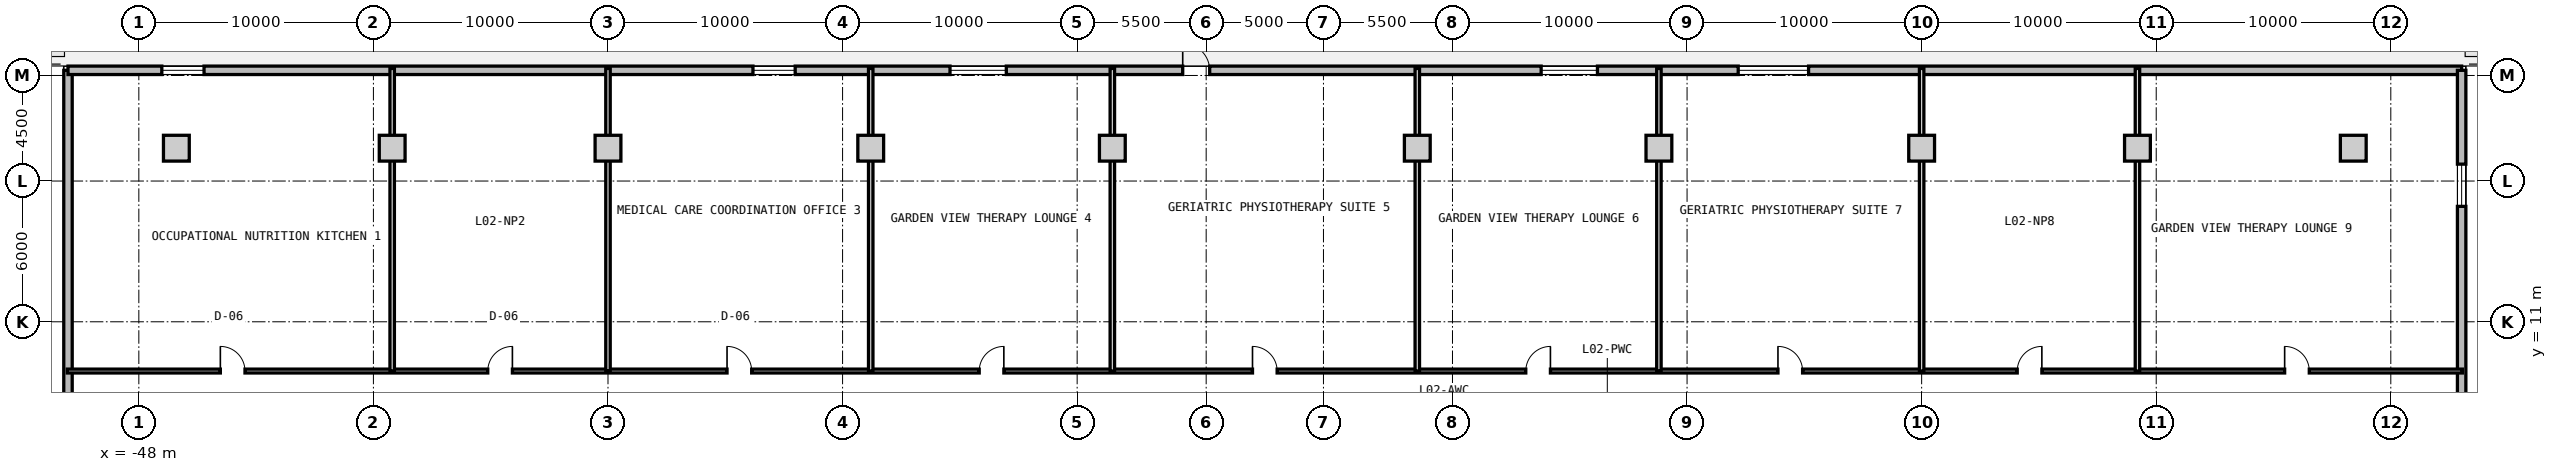
"""IFC4 building model, lengths in metres.
Left out: names, types, materials, properties, quantities, classifications, styles, units other than length and angle.
Written with IfcOpenShell. Run it as: python <this file> out.ifc"""

import sys

from ifc_helpers import new_model, si_unit, direction, frame, frame_2d, origin, origin_2d, place, context, subcontext, project, spatial, rectangle, extrude, source, transform, mapped, element, fill, save


model = new_model("IFC4")
c1 = context("Model", 3, precision=1e-05, world=origin(), true_north=direction((0.0, 1.0)))
c2 = subcontext(c1, "Body", "Model", "MODEL_VIEW")
j1 = project(units=[si_unit("LENGTHUNIT", "METRE"), si_unit("PLANEANGLEUNIT", "RADIAN")], contexts=[c1])
p1 = place(None, origin())
s1 = spatial("IfcSite", under=j1, at=p1, CompositionType="ELEMENT")
p2 = place(p1, origin())
s2 = spatial("IfcBuilding", under=s1, at=p2, CompositionType="ELEMENT")
p3 = place(p2, frame((0.0, 0.0, 8.4)))
s3 = spatial("IfcBuildingStorey", under=s2, at=p3, CompositionType="ELEMENT", Elevation=8.4)
m1 = source(origin(), c2, "Body", "SweptSolid", [
    extrude(rectangle(XDim=1.1, YDim=1.1, at=origin_2d()), origin(), (0.0, 0.0, 1.0), 4.2),
])
for number, where, z_axis, x_axis in (
    (1, (-46.4, 18.4, 0.0), (0.0, 0.0, 1.0), (1.0, 0.0, 0.0)),
    (2, (-37.2, 18.4, 0.0), (0.0, 0.0, 1.0), (1.0, 0.0, 0.0)),
    (3, (-28.0, 18.4, 0.0), (0.0, 0.0, 1.0), (1.0, 0.0, 0.0)),
    (4, (-16.8, 18.4, 0.0), (0.0, 0.0, 1.0), (1.0, 0.0, 0.0)),
    (5, (-6.5, 18.4, 0.0), (0.0, 0.0, 1.0), (1.0, 0.0, 0.0)),
    (6, (6.5, 18.4, 0.0), (0.0, 0.0, 1.0), (1.0, 0.0, 0.0)),
    (7, (16.8, 18.4, 0.0), (0.0, 0.0, 1.0), (1.0, 0.0, 0.0)),
    (8, (28.0, 18.4, 0.0), (0.0, 0.0, 1.0), (1.0, 0.0, 0.0)),
    (9, (37.2, 18.4, 0.0), (0.0, 0.0, 1.0), (1.0, 0.0, 0.0)),
    (10, (46.4, 18.4, 0.0), (0.0, 0.0, 1.0), (1.0, 0.0, 0.0)),
):
    element("IfcColumn", number, at=place(p3, frame(where, z_axis=z_axis, x_axis=x_axis)), inside=s3, PredefinedType="COLUMN", context=c2, shape_type="MappedRepresentation", body=[
        mapped(m1, transform((0.0, 0.0, 0.0), x_axis=(1.0, 0.0, 0.0), y_axis=(0.0, 1.0, 0.0), z_axis=(0.0, 0.0, 1.0), scale=1.0)),
    ])
m2 = source(origin(), c2, "Body", "SweptSolid", [
    extrude(rectangle(XDim=43.44, YDim=0.36, at=frame_2d((21.72, 0.0))), origin(), (0.0, 0.0, 1.0), 3.88),
])
p4 = place(p3, frame((-51.02, -21.72, 0.0), z_axis=(0.0, 0.0, 1.0), x_axis=(0.0, 1.0, 0.0)))
e11 = element("IfcWall", 11, at=p4, inside=s3, PredefinedType="SOLIDWALL", context=c2, shape_type="MappedRepresentation", body=[
    mapped(m2, transform((0.0, 0.0, 0.0), x_axis=(1.0, 0.0, 0.0), y_axis=(0.0, 1.0, 0.0), z_axis=(0.0, 0.0, 1.0), scale=1.0)),
])
p5 = place(p4, frame((4.0, 0.0, 0.9)))
e12 = element("IfcOpeningElement", 12, at=p5, cuts=e11, PredefinedType="OPENING", context=c2, shape_type="SweptSolid", body=[
    extrude(rectangle(XDim=1.8, YDim=2.0, at=frame_2d((0.9, 1.0))), frame((0.0, 0.19, 0.0), z_axis=(0.0, -1.0, 0.0), x_axis=(1.0, 0.0, 0.0)), (0.0, 0.0, 1.0), 0.38),
])
p6 = place(p4, frame((12.4, 0.0, 0.85)))
e13 = element("IfcOpeningElement", 13, at=p6, cuts=e11, PredefinedType="OPENING", context=c2, shape_type="SweptSolid", body=[
    extrude(rectangle(XDim=2.4, YDim=2.2, at=frame_2d((1.2, 1.1))), frame((0.0, 0.19, 0.0), z_axis=(0.0, -1.0, 0.0), x_axis=(1.0, 0.0, 0.0)), (0.0, 0.0, 1.0), 0.38),
])
m3 = source(origin(), c2, "Body", "SweptSolid", [
    extrude(rectangle(XDim=102.04, YDim=0.36, at=frame_2d((51.02, 0.0))), origin(), (0.0, 0.0, 1.0), 3.88),
])
p7 = place(p3, frame((-51.02, 21.72, 0.0), z_axis=(0.0, 0.0, 1.0), x_axis=(1.0, 0.0, 0.0)))
e14 = element("IfcWall", 14, at=p7, inside=s3, PredefinedType="SOLIDWALL", context=c2, shape_type="MappedRepresentation", body=[
    mapped(m3, transform((0.0, 0.0, 0.0), x_axis=(1.0, 0.0, 0.0), y_axis=(0.0, 1.0, 0.0), z_axis=(0.0, 0.0, 1.0), scale=1.0)),
])
p8 = place(p7, frame((47.52, 0.0, 0.0)))
e15 = element("IfcOpeningElement", 15, at=p8, cuts=e14, PredefinedType="OPENING", context=c2, shape_type="SweptSolid", body=[
    extrude(rectangle(XDim=1.15, YDim=2.25, at=frame_2d((0.575, 1.125))), frame((0.0, 0.19, 0.0), z_axis=(0.0, -1.0, 0.0), x_axis=(1.0, 0.0, 0.0)), (0.0, 0.0, 1.0), 0.38),
])
p9 = place(p7, frame((4.0, 0.0, 0.9)))
e16 = element("IfcOpeningElement", 16, at=p9, cuts=e14, PredefinedType="OPENING", context=c2, shape_type="SweptSolid", body=[
    extrude(rectangle(XDim=1.8, YDim=2.0, at=frame_2d((0.9, 1.0))), frame((0.0, 0.19, 0.0), z_axis=(0.0, -1.0, 0.0), x_axis=(1.0, 0.0, 0.0)), (0.0, 0.0, 1.0), 0.38),
])
p10 = place(p7, frame((29.2, 0.0, 0.9)))
e17 = element("IfcOpeningElement", 17, at=p10, cuts=e14, PredefinedType="OPENING", context=c2, shape_type="SweptSolid", body=[
    extrude(rectangle(XDim=1.8, YDim=2.0, at=frame_2d((0.9, 1.0))), frame((0.0, 0.19, 0.0), z_axis=(0.0, -1.0, 0.0), x_axis=(1.0, 0.0, 0.0)), (0.0, 0.0, 1.0), 0.38),
])
p11 = place(p7, frame((37.6, 0.0, 0.85)))
e18 = element("IfcOpeningElement", 18, at=p11, cuts=e14, PredefinedType="OPENING", context=c2, shape_type="SweptSolid", body=[
    extrude(rectangle(XDim=2.4, YDim=2.2, at=frame_2d((1.2, 1.1))), frame((0.0, 0.19, 0.0), z_axis=(0.0, -1.0, 0.0), x_axis=(1.0, 0.0, 0.0)), (0.0, 0.0, 1.0), 0.38),
])
p12 = place(p7, frame((62.8, 0.0, 0.85)))
e19 = element("IfcOpeningElement", 19, at=p12, cuts=e14, PredefinedType="OPENING", context=c2, shape_type="SweptSolid", body=[
    extrude(rectangle(XDim=2.4, YDim=2.2, at=frame_2d((1.2, 1.1))), frame((0.0, 0.19, 0.0), z_axis=(0.0, -1.0, 0.0), x_axis=(1.0, 0.0, 0.0)), (0.0, 0.0, 1.0), 0.38),
])
p13 = place(p7, frame((71.2, 0.0, 0.85)))
e20 = element("IfcOpeningElement", 20, at=p13, cuts=e14, PredefinedType="OPENING", context=c2, shape_type="SweptSolid", body=[
    extrude(rectangle(XDim=3.0, YDim=2.1, at=frame_2d((1.5, 1.05))), frame((0.0, 0.19, 0.0), z_axis=(0.0, -1.0, 0.0), x_axis=(1.0, 0.0, 0.0)), (0.0, 0.0, 1.0), 0.38),
])
p14 = place(p3, frame((51.02, 21.72, 0.0), z_axis=(0.0, 0.0, 1.0), x_axis=(0.0, -1.0, 0.0)))
e21 = element("IfcWall", 21, at=p14, inside=s3, PredefinedType="SOLIDWALL", context=c2, shape_type="MappedRepresentation", body=[
    mapped(m2, transform((0.0, 0.0, 0.0), x_axis=(1.0, 0.0, 0.0), y_axis=(0.0, 1.0, 0.0), z_axis=(0.0, 0.0, 1.0), scale=1.0)),
])
p15 = place(p14, frame((4.0, 0.0, 0.9)))
e22 = element("IfcOpeningElement", 22, at=p15, cuts=e21, PredefinedType="OPENING", context=c2, shape_type="SweptSolid", body=[
    extrude(rectangle(XDim=1.8, YDim=2.0, at=frame_2d((0.9, 1.0))), frame((0.0, 0.19, 0.0), z_axis=(0.0, -1.0, 0.0), x_axis=(1.0, 0.0, 0.0)), (0.0, 0.0, 1.0), 0.38),
])
p16 = place(p14, frame((29.2, 0.0, 0.9)))
e23 = element("IfcOpeningElement", 23, at=p16, cuts=e21, PredefinedType="OPENING", context=c2, shape_type="SweptSolid", body=[
    extrude(rectangle(XDim=1.8, YDim=2.0, at=frame_2d((0.9, 1.0))), frame((0.0, 0.19, 0.0), z_axis=(0.0, -1.0, 0.0), x_axis=(1.0, 0.0, 0.0)), (0.0, 0.0, 1.0), 0.38),
])
m4 = source(origin(), c2, "Body", "SweptSolid", [
    extrude(rectangle(XDim=102.1, YDim=0.165, at=frame_2d((51.05, 0.0))), origin(), (0.0, 0.0, 1.0), 3.865),
])
p17 = place(p3, frame((-51.05, 8.9, 0.0), z_axis=(0.0, 0.0, 1.0), x_axis=(1.0, 0.0, 0.0)))
e24 = element("IfcWall", 24, at=p17, inside=s3, PredefinedType="PARTITIONING", context=c2, shape_type="MappedRepresentation", body=[
    mapped(m4, transform((0.0, 0.0, 0.0), x_axis=(1.0, 0.0, 0.0), y_axis=(0.0, 1.0, 0.0), z_axis=(0.0, 0.0, 1.0), scale=1.0)),
])
p18 = place(p17, frame((6.525, 0.0, 0.0)))
e25 = element("IfcOpeningElement", 25, at=p18, cuts=e24, PredefinedType="OPENING", context=c2, shape_type="SweptSolid", body=[
    extrude(rectangle(XDim=1.05, YDim=2.15, at=frame_2d((0.525, 1.075))), frame((0.0, 0.093, 0.0), z_axis=(0.0, -1.0, 0.0), x_axis=(1.0, 0.0, 0.0)), (0.0, 0.0, 1.0), 0.185),
])
p19 = place(p17, frame((17.925, 0.0, 0.0)))
e26 = element("IfcOpeningElement", 26, at=p19, cuts=e24, PredefinedType="OPENING", context=c2, shape_type="SweptSolid", body=[
    extrude(rectangle(XDim=1.05, YDim=2.15, at=frame_2d((0.525, 1.075))), frame((0.0, 0.093, 0.0), z_axis=(0.0, -1.0, 0.0), x_axis=(1.0, 0.0, 0.0)), (0.0, 0.0, 1.0), 0.185),
])
p20 = place(p17, frame((28.125, 0.0, 0.0)))
e27 = element("IfcOpeningElement", 27, at=p20, cuts=e24, PredefinedType="OPENING", context=c2, shape_type="SweptSolid", body=[
    extrude(rectangle(XDim=1.05, YDim=2.15, at=frame_2d((0.525, 1.075))), frame((0.0, 0.093, 0.0), z_axis=(0.0, -1.0, 0.0), x_axis=(1.0, 0.0, 0.0)), (0.0, 0.0, 1.0), 0.185),
])
p21 = place(p17, frame((38.875, 0.0, 0.0)))
e28 = element("IfcOpeningElement", 28, at=p21, cuts=e24, PredefinedType="OPENING", context=c2, shape_type="SweptSolid", body=[
    extrude(rectangle(XDim=1.05, YDim=2.15, at=frame_2d((0.525, 1.075))), frame((0.0, 0.093, 0.0), z_axis=(0.0, -1.0, 0.0), x_axis=(1.0, 0.0, 0.0)), (0.0, 0.0, 1.0), 0.185),
])
p22 = place(p17, frame((50.525, 0.0, 0.0)))
e29 = element("IfcOpeningElement", 29, at=p22, cuts=e24, PredefinedType="OPENING", context=c2, shape_type="SweptSolid", body=[
    extrude(rectangle(XDim=1.05, YDim=2.15, at=frame_2d((0.525, 1.075))), frame((0.0, 0.093, 0.0), z_axis=(0.0, -1.0, 0.0), x_axis=(1.0, 0.0, 0.0)), (0.0, 0.0, 1.0), 0.185),
])
p23 = place(p17, frame((62.175, 0.0, 0.0)))
e30 = element("IfcOpeningElement", 30, at=p23, cuts=e24, PredefinedType="OPENING", context=c2, shape_type="SweptSolid", body=[
    extrude(rectangle(XDim=1.05, YDim=2.15, at=frame_2d((0.525, 1.075))), frame((0.0, 0.093, 0.0), z_axis=(0.0, -1.0, 0.0), x_axis=(1.0, 0.0, 0.0)), (0.0, 0.0, 1.0), 0.185),
])
p24 = place(p17, frame((72.925, 0.0, 0.0)))
e31 = element("IfcOpeningElement", 31, at=p24, cuts=e24, PredefinedType="OPENING", context=c2, shape_type="SweptSolid", body=[
    extrude(rectangle(XDim=1.05, YDim=2.15, at=frame_2d((0.525, 1.075))), frame((0.0, 0.093, 0.0), z_axis=(0.0, -1.0, 0.0), x_axis=(1.0, 0.0, 0.0)), (0.0, 0.0, 1.0), 0.185),
])
p25 = place(p17, frame((83.125, 0.0, 0.0)))
e32 = element("IfcOpeningElement", 32, at=p25, cuts=e24, PredefinedType="OPENING", context=c2, shape_type="SweptSolid", body=[
    extrude(rectangle(XDim=1.05, YDim=2.15, at=frame_2d((0.525, 1.075))), frame((0.0, 0.093, 0.0), z_axis=(0.0, -1.0, 0.0), x_axis=(1.0, 0.0, 0.0)), (0.0, 0.0, 1.0), 0.185),
])
p26 = place(p17, frame((94.525, 0.0, 0.0)))
e33 = element("IfcOpeningElement", 33, at=p26, cuts=e24, PredefinedType="OPENING", context=c2, shape_type="SweptSolid", body=[
    extrude(rectangle(XDim=1.05, YDim=2.15, at=frame_2d((0.525, 1.075))), frame((0.0, 0.093, 0.0), z_axis=(0.0, -1.0, 0.0), x_axis=(1.0, 0.0, 0.0)), (0.0, 0.0, 1.0), 0.185),
])
m5 = source(origin(), c2, "Body", "SweptSolid", [
    extrude(rectangle(XDim=12.9, YDim=0.19, at=frame_2d((6.45, 0.0))), origin(), (0.0, 0.0, 1.0), 3.865),
])
for number, where, z_axis, x_axis in (
    (34, (-37.2, 8.9, 0.0), (0.0, 0.0, 1.0), (0.0, 1.0, 0.0)),
    (35, (-28.0, 8.9, 0.0), (0.0, 0.0, 1.0), (0.0, 1.0, 0.0)),
    (36, (-16.8, 8.9, 0.0), (0.0, 0.0, 1.0), (0.0, 1.0, 0.0)),
):
    element("IfcWall", number, at=place(p3, frame(where, z_axis=z_axis, x_axis=x_axis)), inside=s3, PredefinedType="PARTITIONING", context=c2, shape_type="MappedRepresentation", body=[
        mapped(m5, transform((0.0, 0.0, 0.0), x_axis=(1.0, 0.0, 0.0), y_axis=(0.0, 1.0, 0.0), z_axis=(0.0, 0.0, 1.0), scale=1.0)),
    ])
m6 = source(origin(), c2, "Body", "SweptSolid", [
    extrude(rectangle(XDim=12.9, YDim=0.19, at=frame_2d((6.45, 0.0))), origin(), (0.0, 0.0, 1.0), 3.215),
])
for number, where, z_axis, x_axis in (
    (37, (-6.5, 8.9, 0.0), (0.0, 0.0, 1.0), (0.0, 1.0, 0.0)),
    (38, (6.5, 8.9, 0.0), (0.0, 0.0, 1.0), (0.0, 1.0, 0.0)),
    (39, (16.8, 8.9, 0.0), (0.0, 0.0, 1.0), (0.0, 1.0, 0.0)),
):
    element("IfcWall", number, at=place(p3, frame(where, z_axis=z_axis, x_axis=x_axis)), inside=s3, PredefinedType="PARTITIONING", context=c2, shape_type="MappedRepresentation", body=[
        mapped(m6, transform((0.0, 0.0, 0.0), x_axis=(1.0, 0.0, 0.0), y_axis=(0.0, 1.0, 0.0), z_axis=(0.0, 0.0, 1.0), scale=1.0)),
    ])
for number, where, z_axis, x_axis in (
    (40, (28.0, 8.9, 0.0), (0.0, 0.0, 1.0), (0.0, 1.0, 0.0)),
    (41, (37.2, 8.9, 0.0), (0.0, 0.0, 1.0), (0.0, 1.0, 0.0)),
):
    element("IfcWall", number, at=place(p3, frame(where, z_axis=z_axis, x_axis=x_axis)), inside=s3, PredefinedType="PARTITIONING", context=c2, shape_type="MappedRepresentation", body=[
        mapped(m5, transform((0.0, 0.0, 0.0), x_axis=(1.0, 0.0, 0.0), y_axis=(0.0, 1.0, 0.0), z_axis=(0.0, 0.0, 1.0), scale=1.0)),
    ])
m7 = source(origin(), c2, "Body", "SweptSolid", [
    extrude(rectangle(XDim=1.15, YDim=2.25, at=frame_2d((0.575, 1.125))), frame((0.0, 0.025, 0.0), z_axis=(0.0, -1.0, 0.0), x_axis=(1.0, 0.0, 0.0)), (0.0, 0.0, 1.0), 0.05),
])
p27 = place(p8, origin())
e42 = element("IfcDoor", 42, at=p27, inside=s3, OperationType="SINGLE_SWING_LEFT", PredefinedType="DOOR", context=c2, shape_type="MappedRepresentation", body=[
    mapped(m7, transform((0.0, 0.0, 0.0), x_axis=(1.0, 0.0, 0.0), y_axis=(0.0, 1.0, 0.0), z_axis=(0.0, 0.0, 1.0), scale=1.0)),
])
fill(e15, e42)
m8 = source(origin(), c2, "Body", "SweptSolid", [
    extrude(rectangle(XDim=1.8, YDim=2.0, at=frame_2d((0.9, 1.0))), frame((0.0, 0.03, 0.0), z_axis=(0.0, -1.0, 0.0), x_axis=(1.0, 0.0, 0.0)), (0.0, 0.0, 1.0), 0.06),
])
p28 = place(p9, origin())
e43 = element("IfcWindow", 43, at=p28, inside=s3, PartitioningType="SINGLE_PANEL", PredefinedType="WINDOW", context=c2, shape_type="MappedRepresentation", body=[
    mapped(m8, transform((0.0, 0.0, 0.0), x_axis=(1.0, 0.0, 0.0), y_axis=(0.0, 1.0, 0.0), z_axis=(0.0, 0.0, 1.0), scale=1.0)),
])
fill(e16, e43)
p29 = place(p10, origin())
e44 = element("IfcWindow", 44, at=p29, inside=s3, PartitioningType="SINGLE_PANEL", PredefinedType="WINDOW", context=c2, shape_type="MappedRepresentation", body=[
    mapped(m8, transform((0.0, 0.0, 0.0), x_axis=(1.0, 0.0, 0.0), y_axis=(0.0, 1.0, 0.0), z_axis=(0.0, 0.0, 1.0), scale=1.0)),
])
fill(e17, e44)
m9 = source(origin(), c2, "Body", "SweptSolid", [
    extrude(rectangle(XDim=2.4, YDim=2.2, at=frame_2d((1.2, 1.1))), frame((0.0, 0.03, 0.0), z_axis=(0.0, -1.0, 0.0), x_axis=(1.0, 0.0, 0.0)), (0.0, 0.0, 1.0), 0.06),
])
p30 = place(p11, origin())
e45 = element("IfcWindow", 45, at=p30, inside=s3, PartitioningType="SINGLE_PANEL", PredefinedType="WINDOW", context=c2, shape_type="MappedRepresentation", body=[
    mapped(m9, transform((0.0, 0.0, 0.0), x_axis=(1.0, 0.0, 0.0), y_axis=(0.0, 1.0, 0.0), z_axis=(0.0, 0.0, 1.0), scale=1.0)),
])
fill(e18, e45)
p31 = place(p12, origin())
e46 = element("IfcWindow", 46, at=p31, inside=s3, PartitioningType="SINGLE_PANEL", PredefinedType="WINDOW", context=c2, shape_type="MappedRepresentation", body=[
    mapped(m9, transform((0.0, 0.0, 0.0), x_axis=(1.0, 0.0, 0.0), y_axis=(0.0, 1.0, 0.0), z_axis=(0.0, 0.0, 1.0), scale=1.0)),
])
fill(e19, e46)
m10 = source(origin(), c2, "Body", "SweptSolid", [
    extrude(rectangle(XDim=3.0, YDim=2.1, at=frame_2d((1.5, 1.05))), frame((0.0, 0.03, 0.0), z_axis=(0.0, -1.0, 0.0), x_axis=(1.0, 0.0, 0.0)), (0.0, 0.0, 1.0), 0.06),
])
p32 = place(p13, origin())
e47 = element("IfcWindow", 47, at=p32, inside=s3, PartitioningType="SINGLE_PANEL", PredefinedType="WINDOW", context=c2, shape_type="MappedRepresentation", body=[
    mapped(m10, transform((0.0, 0.0, 0.0), x_axis=(1.0, 0.0, 0.0), y_axis=(0.0, 1.0, 0.0), z_axis=(0.0, 0.0, 1.0), scale=1.0)),
])
fill(e20, e47)
p33 = place(p15, origin())
e48 = element("IfcWindow", 48, at=p33, inside=s3, PartitioningType="SINGLE_PANEL", PredefinedType="WINDOW", context=c2, shape_type="MappedRepresentation", body=[
    mapped(m8, transform((0.0, 0.0, 0.0), x_axis=(1.0, 0.0, 0.0), y_axis=(0.0, 1.0, 0.0), z_axis=(0.0, 0.0, 1.0), scale=1.0)),
])
fill(e22, e48)
m11 = source(origin(), c2, "Body", "SweptSolid", [
    extrude(rectangle(XDim=1.05, YDim=2.15, at=frame_2d((0.525, 1.075))), frame((0.0, 0.025, 0.0), z_axis=(0.0, -1.0, 0.0), x_axis=(1.0, 0.0, 0.0)), (0.0, 0.0, 1.0), 0.05),
])
p34 = place(p18, origin())
e49 = element("IfcDoor", 49, at=p34, inside=s3, OperationType="SINGLE_SWING_LEFT", PredefinedType="DOOR", context=c2, shape_type="MappedRepresentation", body=[
    mapped(m11, transform((0.0, 0.0, 0.0), x_axis=(1.0, 0.0, 0.0), y_axis=(0.0, 1.0, 0.0), z_axis=(0.0, 0.0, 1.0), scale=1.0)),
])
fill(e25, e49)
p35 = place(p19, origin())
e50 = element("IfcDoor", 50, at=p35, inside=s3, OperationType="SINGLE_SWING_RIGHT", PredefinedType="DOOR", context=c2, shape_type="MappedRepresentation", body=[
    mapped(m11, transform((0.0, 0.0, 0.0), x_axis=(1.0, 0.0, 0.0), y_axis=(0.0, 1.0, 0.0), z_axis=(0.0, 0.0, 1.0), scale=1.0)),
])
fill(e26, e50)
p36 = place(p20, origin())
e51 = element("IfcDoor", 51, at=p36, inside=s3, OperationType="SINGLE_SWING_LEFT", PredefinedType="DOOR", context=c2, shape_type="MappedRepresentation", body=[
    mapped(m11, transform((0.0, 0.0, 0.0), x_axis=(1.0, 0.0, 0.0), y_axis=(0.0, 1.0, 0.0), z_axis=(0.0, 0.0, 1.0), scale=1.0)),
])
fill(e27, e51)
p37 = place(p21, origin())
e52 = element("IfcDoor", 52, at=p37, inside=s3, OperationType="SINGLE_SWING_RIGHT", PredefinedType="DOOR", context=c2, shape_type="MappedRepresentation", body=[
    mapped(m11, transform((0.0, 0.0, 0.0), x_axis=(1.0, 0.0, 0.0), y_axis=(0.0, 1.0, 0.0), z_axis=(0.0, 0.0, 1.0), scale=1.0)),
])
fill(e28, e52)
p38 = place(p22, origin())
e53 = element("IfcDoor", 53, at=p38, inside=s3, OperationType="SINGLE_SWING_LEFT", PredefinedType="DOOR", context=c2, shape_type="MappedRepresentation", body=[
    mapped(m11, transform((0.0, 0.0, 0.0), x_axis=(1.0, 0.0, 0.0), y_axis=(0.0, 1.0, 0.0), z_axis=(0.0, 0.0, 1.0), scale=1.0)),
])
fill(e29, e53)
p39 = place(p23, origin())
e54 = element("IfcDoor", 54, at=p39, inside=s3, OperationType="SINGLE_SWING_RIGHT", PredefinedType="DOOR", context=c2, shape_type="MappedRepresentation", body=[
    mapped(m11, transform((0.0, 0.0, 0.0), x_axis=(1.0, 0.0, 0.0), y_axis=(0.0, 1.0, 0.0), z_axis=(0.0, 0.0, 1.0), scale=1.0)),
])
fill(e30, e54)
p40 = place(p24, origin())
e55 = element("IfcDoor", 55, at=p40, inside=s3, OperationType="SINGLE_SWING_LEFT", PredefinedType="DOOR", context=c2, shape_type="MappedRepresentation", body=[
    mapped(m11, transform((0.0, 0.0, 0.0), x_axis=(1.0, 0.0, 0.0), y_axis=(0.0, 1.0, 0.0), z_axis=(0.0, 0.0, 1.0), scale=1.0)),
])
fill(e31, e55)
p41 = place(p25, origin())
e56 = element("IfcDoor", 56, at=p41, inside=s3, OperationType="SINGLE_SWING_RIGHT", PredefinedType="DOOR", context=c2, shape_type="MappedRepresentation", body=[
    mapped(m11, transform((0.0, 0.0, 0.0), x_axis=(1.0, 0.0, 0.0), y_axis=(0.0, 1.0, 0.0), z_axis=(0.0, 0.0, 1.0), scale=1.0)),
])
fill(e32, e56)
p42 = place(p26, origin())
e57 = element("IfcDoor", 57, at=p42, inside=s3, OperationType="SINGLE_SWING_LEFT", PredefinedType="DOOR", context=c2, shape_type="MappedRepresentation", body=[
    mapped(m11, transform((0.0, 0.0, 0.0), x_axis=(1.0, 0.0, 0.0), y_axis=(0.0, 1.0, 0.0), z_axis=(0.0, 0.0, 1.0), scale=1.0)),
])
fill(e33, e57)
save(model, sys.argv[1])
